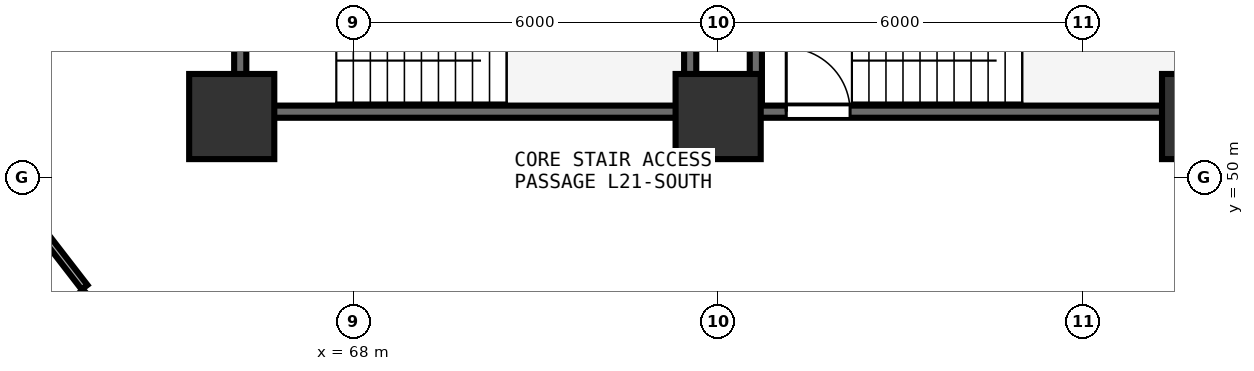
"""IFC4 building model, lengths in metres.
Left out: names, types, materials, properties, quantities, classifications, styles, units other than length and angle.
Written with IfcOpenShell. Run it as: python <this file> out.ifc"""

import sys

from ifc_helpers import new_model, si_unit, direction, frame, frame_2d, origin, origin_2d, place, context, subcontext, project, spatial, rectangle, extrude, element, fill, save


model = new_model("IFC4")
c1 = context("Model", 3, precision=1e-05, world=origin(), true_north=direction((0.0, 1.0)))
c2 = subcontext(c1, "Body", "Model", "MODEL_VIEW")
j1 = project(units=[si_unit("LENGTHUNIT", "METRE"), si_unit("PLANEANGLEUNIT", "RADIAN")], contexts=[c1])
p1 = place(None, origin())
s1 = spatial("IfcSite", under=j1, at=p1, CompositionType="ELEMENT")
p2 = place(p1, origin())
s2 = spatial("IfcBuilding", under=s1, at=p2, CompositionType="ELEMENT")
p3 = place(p2, frame((0.0, 0.0, 83.85)))
s3 = spatial("IfcBuildingStorey", under=s2, at=p3, CompositionType="ELEMENT", Elevation=83.85)
for number, where, z_axis, x_axis in (
    (1, (66.0, 51.0, 0.0), (0.0, 0.0, 1.0), (1.0, 0.0, 0.0)),
    (2, (74.0, 51.0, 0.0), (0.0, 0.0, 1.0), (1.0, 0.0, 0.0)),
    (3, (82.0, 51.0, 0.0), (0.0, 0.0, 1.0), (1.0, 0.0, 0.0)),
):
    element("IfcColumn", number, at=place(p3, frame(where, z_axis=z_axis, x_axis=x_axis)), inside=s3, PredefinedType="PILASTER", context=c2, shape_type="SweptSolid", body=[
        extrude(rectangle(XDim=1.4, YDim=1.4, at=origin_2d()), origin(), (0.0, 0.0, 1.0), 3.75),
    ])
p4 = place(p3, frame((74.0, 51.08, 0.0), z_axis=(0.0, 0.0, 1.0), x_axis=(1.0, 0.0, 0.0)))
e4 = element("IfcWall", 4, at=p4, inside=s3, PredefinedType="SHEAR", context=c2, shape_type="SweptSolid", body=[
    extrude(rectangle(XDim=7.9, YDim=0.2, at=frame_2d((3.95, 0.0))), origin(), (0.0, 0.0, 1.0), 3.49),
])
p5 = place(p4, frame((1.12, 0.0, 0.0)))
e5 = element("IfcOpeningElement", 5, at=p5, cuts=e4, PredefinedType="OPENING", context=c2, shape_type="SweptSolid", body=[
    extrude(rectangle(XDim=1.05, YDim=2.1, at=frame_2d((0.525, 1.05))), frame((0.0, 0.11, 0.0), z_axis=(0.0, -1.0, 0.0), x_axis=(1.0, 0.0, 0.0)), (0.0, 0.0, 1.0), 0.22),
])
p6 = place(p3, frame((74.62, 54.27, 0.0), z_axis=(0.0, 0.0, 1.0), x_axis=(0.0, -1.0, 0.0)))
e6 = element("IfcWall", 6, at=p6, inside=s3, PredefinedType="SHEAR", context=c2, shape_type="SweptSolid", body=[
    extrude(rectangle(XDim=3.07, YDim=0.2, at=frame_2d((1.535, 0.0))), origin(), (0.0, 0.0, 1.0), 3.49),
])
p7 = place(p3, frame((66.26, 51.08, 0.0), z_axis=(0.0, 0.0, 1.0), x_axis=(1.0, 0.0, 0.0)))
e7 = element("IfcWall", 7, at=p7, inside=s3, PredefinedType="SHEAR", context=c2, shape_type="SweptSolid", body=[
    extrude(rectangle(XDim=7.16, YDim=0.2, at=frame_2d((3.58, 0.0))), origin(), (0.0, 0.0, 1.0), 3.49),
])
p8 = place(p3, frame((73.54, 51.2, 0.0), z_axis=(0.0, 0.0, 1.0), x_axis=(0.0, 1.0, 0.0)))
e8 = element("IfcWall", 8, at=p8, inside=s3, PredefinedType="SHEAR", context=c2, shape_type="SweptSolid", body=[
    extrude(rectangle(XDim=3.07, YDim=0.2, at=frame_2d((1.535, 0.0))), origin(), (0.0, 0.0, 1.0), 3.49),
])
p9 = place(p3, frame((66.14, 54.27, 0.0), z_axis=(0.0, 0.0, 1.0), x_axis=(0.0, -1.0, 0.0)))
e9 = element("IfcWall", 9, at=p9, inside=s3, PredefinedType="SHEAR", context=c2, shape_type="SweptSolid", body=[
    extrude(rectangle(XDim=3.07, YDim=0.2, at=frame_2d((1.535, 0.0))), origin(), (0.0, 0.0, 1.0), 3.49),
])
p10 = place(p9, frame((1.01, 0.0, 0.0)))
e10 = element("IfcOpeningElement", 10, at=p10, cuts=e9, PredefinedType="OPENING", context=c2, shape_type="SweptSolid", body=[
    extrude(rectangle(XDim=1.05, YDim=2.1, at=frame_2d((0.525, 1.05))), frame((0.0, 0.11, 0.0), z_axis=(0.0, -1.0, 0.0), x_axis=(1.0, 0.0, 0.0)), (0.0, 0.0, 1.0), 0.22),
])
p11 = place(p3, frame((60.275, 52.473, 0.0), z_axis=(0.0, 0.0, 1.0), x_axis=(0.611167326409, -0.791501420801, 0.0)))
e11 = element("IfcWall", 11, at=p11, inside=s3, PredefinedType="PARTITIONING", context=c2, shape_type="SweptSolid", body=[
    extrude(rectangle(XDim=5.407, YDim=0.12, at=frame_2d((2.704, 0.0))), origin(), (0.0, 0.0, 1.0), 2.925),
])
p12 = place(p11, frame((2.254, 0.0, 0.0)))
e12 = element("IfcOpeningElement", 12, at=p12, cuts=e11, PredefinedType="OPENING", context=c2, shape_type="SweptSolid", body=[
    extrude(rectangle(XDim=0.9, YDim=2.08, at=frame_2d((0.45, 1.04))), frame((0.0, 0.07, 0.0), z_axis=(0.0, -1.0, 0.0), x_axis=(1.0, 0.0, 0.0)), (0.0, 0.0, 1.0), 0.14),
])
p13 = place(p3, frame((81.494, 46.198, 0.0), z_axis=(0.0, 0.0, 1.0), x_axis=(0.785315722545, 0.619095482074, 0.0)))
e13 = element("IfcWall", 13, at=p13, inside=s3, PredefinedType="PARTITIONING", context=c2, shape_type="SweptSolid", body=[
    extrude(rectangle(XDim=5.54, YDim=0.12, at=frame_2d((2.77, 0.0))), origin(), (0.0, 0.0, 1.0), 2.925),
])
p14 = place(p13, frame((2.32, 0.0, 0.0)))
e14 = element("IfcOpeningElement", 14, at=p14, cuts=e13, PredefinedType="OPENING", context=c2, shape_type="SweptSolid", body=[
    extrude(rectangle(XDim=0.9, YDim=2.08, at=frame_2d((0.45, 1.04))), frame((0.0, 0.07, 0.0), z_axis=(0.0, -1.0, 0.0), x_axis=(1.0, 0.0, 0.0)), (0.0, 0.0, 1.0), 0.14),
])
p15 = place(p3, frame((63.587, 48.119, 0.0), z_axis=(0.0, 0.0, 1.0), x_axis=(-0.735387084409, -0.677647279995, 0.0)))
e15 = element("IfcWall", 15, at=p15, inside=s3, PredefinedType="PARTITIONING", context=c2, shape_type="SweptSolid", body=[
    extrude(rectangle(XDim=9.361, YDim=0.1, at=frame_2d((4.681, 0.0))), origin(), (0.0, 0.0, 1.0), 2.975),
])
p16 = place(p5, origin())
e16 = element("IfcDoor", 16, at=p16, inside=s3, OperationType="SINGLE_SWING_LEFT", PredefinedType="DOOR", context=c2, shape_type="SweptSolid", body=[
    extrude(rectangle(XDim=1.05, YDim=2.1, at=frame_2d((0.525, 1.05))), frame((0.0, 0.025, 0.0), z_axis=(0.0, -1.0, 0.0), x_axis=(1.0, 0.0, 0.0)), (0.0, 0.0, 1.0), 0.05),
])
fill(e5, e16)
save(model, sys.argv[1])
